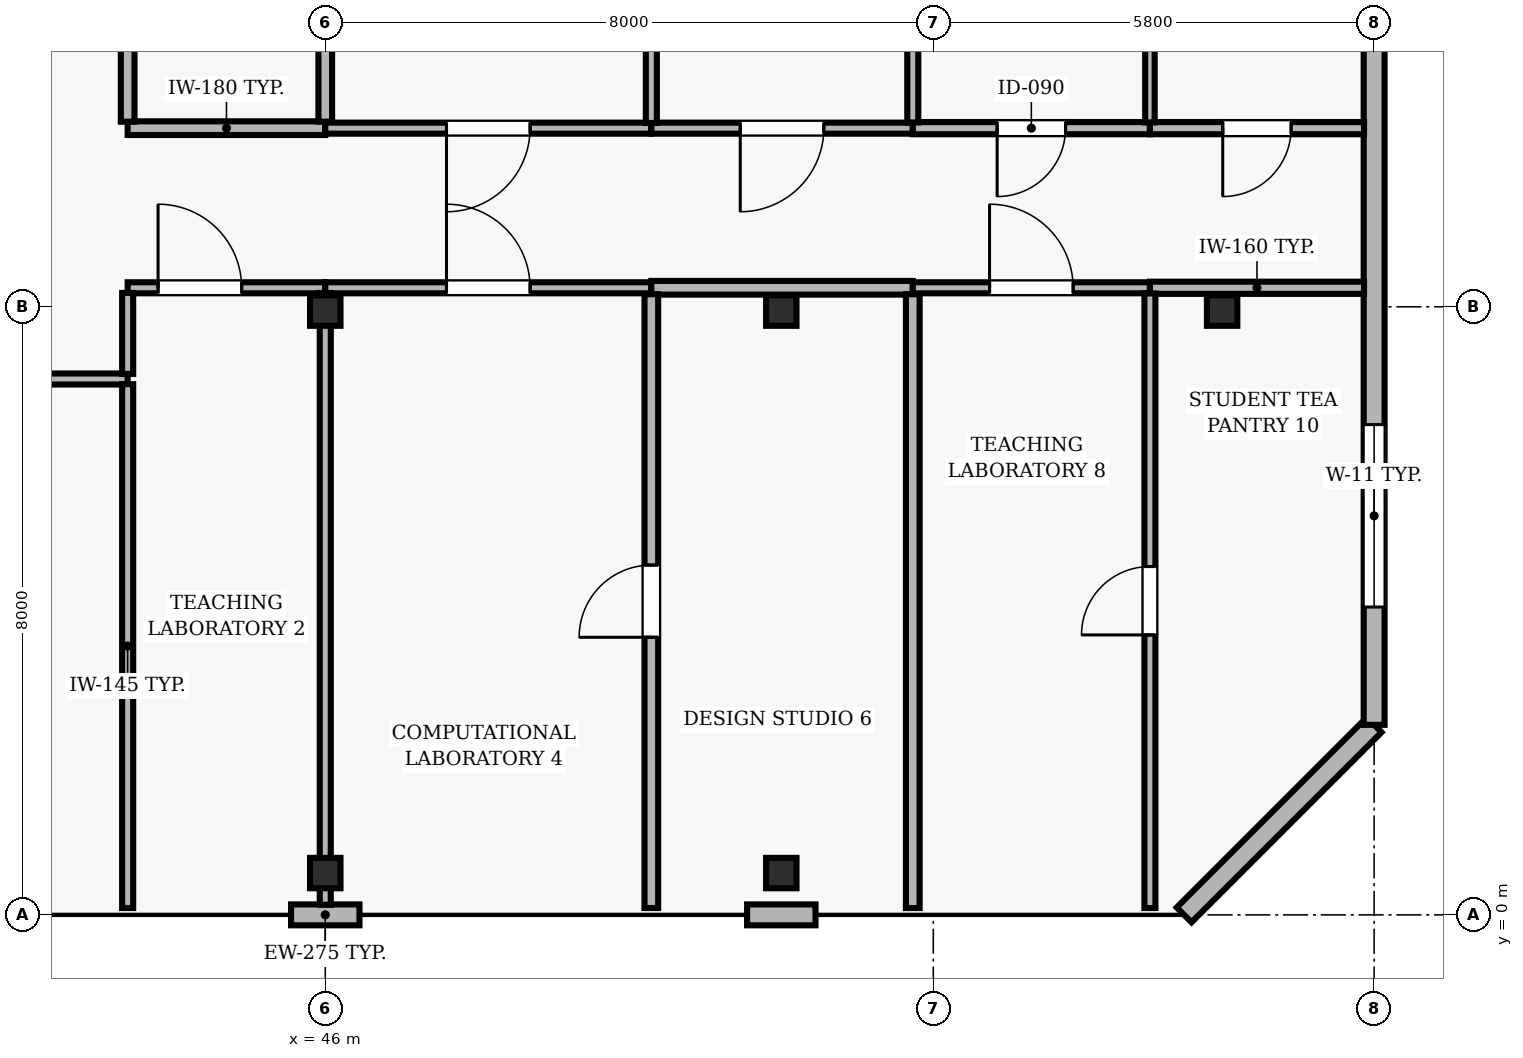
"""IFC4 building model, lengths in metres.
Left out: names, types, materials, properties, quantities, classifications, styles, units other than length and angle.
Written with IfcOpenShell. Run it as: python <this file> out.ifc"""

import sys

from ifc_helpers import new_model, si_unit, direction, frame, frame_2d, origin, origin_2d, place, context, subcontext, project, spatial, rectangle, hollow_rectangle, extrude, element, fill, save


model = new_model("IFC4")
c1 = context("Model", 3, precision=1e-05, world=origin(), true_north=direction((0.0, 1.0)))
c2 = subcontext(c1, "Body", "Model", "MODEL_VIEW")
j1 = project(units=[si_unit("LENGTHUNIT", "METRE"), si_unit("PLANEANGLEUNIT", "RADIAN")], contexts=[c1])
p1 = place(None, origin())
s1 = spatial("IfcSite", under=j1, at=p1, CompositionType="ELEMENT")
p2 = place(p1, origin())
s2 = spatial("IfcBuilding", under=s1, at=p2, CompositionType="ELEMENT")
p3 = place(p2, frame((0.0, 0.0, 279.4)))
s3 = spatial("IfcBuildingStorey", under=s2, at=p3, CompositionType="ELEMENT", Elevation=279.4)
for number, where, z_axis, x_axis in (
    (1, (46.0, 0.55, 0.0), (0.0, 0.0, 1.0), (1.0, 0.0, 0.0)),
    (2, (46.0, 7.95, 0.0), (0.0, 0.0, 1.0), (1.0, 0.0, 0.0)),
    (3, (52.0, 0.55, 0.0), (0.0, 0.0, 1.0), (1.0, 0.0, 0.0)),
    (4, (52.0, 7.95, 0.0), (0.0, 0.0, 1.0), (1.0, 0.0, 0.0)),
    (5, (57.8, 7.95, 0.0), (0.0, 0.0, 1.0), (1.0, 0.0, 0.0)),
):
    element("IfcColumn", number, at=place(p3, frame(where, z_axis=z_axis, x_axis=x_axis)), inside=s3, PredefinedType="COLUMN", context=c2, shape_type="SweptSolid", body=[
        extrude(hollow_rectangle(XDim=0.4, YDim=0.4, WallThickness=0.02, at=origin_2d()), origin(), (0.0, 0.0, 1.0), 3.9),
    ])
for number, where, z_axis, x_axis in (
    (6, (45.55, 0.0, 0.0), (0.0, 0.0, 1.0), (1.0, 0.0, 0.0)),
    (7, (51.55, 0.0, 0.0), (0.0, 0.0, 1.0), (1.0, 0.0, 0.0)),
):
    element("IfcWall", number, at=place(p3, frame(where, z_axis=z_axis, x_axis=x_axis)), inside=s3, PredefinedType="SOLIDWALL", context=c2, shape_type="SweptSolid", body=[
        extrude(rectangle(XDim=0.9, YDim=0.275, at=frame_2d((0.45, 0.0))), origin(), (0.0, 0.0, 1.0), 3.69),
    ])
p4 = place(p3, frame((57.3, 0.0, 0.0), z_axis=(0.0, 0.0, 1.0), x_axis=(0.707106781187, 0.707106781187, 0.0)))
e8 = element("IfcWall", 8, at=p4, inside=s3, PredefinedType="SOLIDWALL", context=c2, shape_type="SweptSolid", body=[
    extrude(rectangle(XDim=3.536, YDim=0.275, at=frame_2d((1.768, 0.0))), origin(), (0.0, 0.0, 1.0), 3.69),
])
p5 = place(p3, frame((59.8, 2.5, 0.0), z_axis=(0.0, 0.0, 1.0), x_axis=(0.0, 1.0, 0.0)))
e9 = element("IfcWall", 9, at=p5, inside=s3, PredefinedType="SOLIDWALL", context=c2, shape_type="SweptSolid", body=[
    extrude(rectangle(XDim=11.0, YDim=0.275, at=frame_2d((5.5, 0.0))), origin(), (0.0, 0.0, 1.0), 3.69),
])
p6 = place(p5, frame((1.55, 0.0, 0.9)))
e10 = element("IfcOpeningElement", 10, at=p6, cuts=e9, PredefinedType="OPENING", context=c2, shape_type="SweptSolid", body=[
    extrude(rectangle(XDim=2.4, YDim=2.2, at=frame_2d((1.2, 1.1))), frame((0.0, 0.147, 0.0), z_axis=(0.0, -1.0, 0.0), x_axis=(1.0, 0.0, 0.0)), (0.0, 0.0, 1.0), 0.295),
])
p7 = place(p3, frame((38.05, 7.05, 0.0), z_axis=(0.0, 0.0, 1.0), x_axis=(1.0, 0.0, 0.0)))
e11 = element("IfcWall", 11, at=p7, inside=s3, PredefinedType="PARTITIONING", context=c2, shape_type="SweptSolid", body=[
    extrude(rectangle(XDim=5.35, YDim=0.145, at=frame_2d((2.675, 0.0))), origin(), (0.0, 0.0, 1.0), 3.69),
])
p8 = place(p7, frame((2.125, 0.0, 0.0)))
e12 = element("IfcOpeningElement", 12, at=p8, cuts=e11, PredefinedType="OPENING", context=c2, shape_type="SweptSolid", body=[
    extrude(rectangle(XDim=1.1, YDim=2.15, at=frame_2d((0.55, 1.075))), frame((0.0, 0.083, 0.0), z_axis=(0.0, -1.0, 0.0), x_axis=(1.0, 0.0, 0.0)), (0.0, 0.0, 1.0), 0.165),
])
p9 = place(p3, frame((43.4, 8.25, 0.0), z_axis=(0.0, 0.0, 1.0), x_axis=(1.0, 0.0, 0.0)))
e13 = element("IfcWall", 13, at=p9, inside=s3, PredefinedType="PARTITIONING", context=c2, shape_type="SweptSolid", body=[
    extrude(rectangle(XDim=2.6, YDim=0.145, at=frame_2d((1.3, 0.0))), origin(), (0.0, 0.0, 1.0), 3.221),
])
p10 = place(p9, frame((0.4, 0.0, 0.0)))
e14 = element("IfcOpeningElement", 14, at=p10, cuts=e13, PredefinedType="OPENING", context=c2, shape_type="SweptSolid", body=[
    extrude(rectangle(XDim=1.1, YDim=2.15, at=frame_2d((0.55, 1.075))), frame((0.0, 0.083, 0.0), z_axis=(0.0, -1.0, 0.0), x_axis=(1.0, 0.0, 0.0)), (0.0, 0.0, 1.0), 0.165),
])
p11 = place(p3, frame((46.0, 8.25, 0.0), z_axis=(0.0, 0.0, 1.0), x_axis=(1.0, 0.0, 0.0)))
e15 = element("IfcWall", 15, at=p11, inside=s3, PredefinedType="PARTITIONING", context=c2, shape_type="SweptSolid", body=[
    extrude(rectangle(XDim=4.29, YDim=0.145, at=frame_2d((2.145, 0.0))), origin(), (0.0, 0.0, 1.0), 3.221),
])
p12 = place(p11, frame((1.595, 0.0, 0.0)))
e16 = element("IfcOpeningElement", 16, at=p12, cuts=e15, PredefinedType="OPENING", context=c2, shape_type="SweptSolid", body=[
    extrude(rectangle(XDim=1.1, YDim=2.15, at=frame_2d((0.55, 1.075))), frame((0.0, 0.083, 0.0), z_axis=(0.0, -1.0, 0.0), x_axis=(1.0, 0.0, 0.0)), (0.0, 0.0, 1.0), 0.165),
])
p13 = place(p3, frame((46.0, 10.35, 0.0), z_axis=(0.0, 0.0, 1.0), x_axis=(-1.0, 0.0, 0.0)))
e17 = element("IfcWall", 17, at=p13, inside=s3, PredefinedType="PARTITIONING", context=c2, shape_type="SweptSolid", body=[
    extrude(rectangle(XDim=2.6, YDim=0.18, at=frame_2d((1.3, 0.0))), origin(), (0.0, 0.0, 1.0), 3.372),
])
p14 = place(p3, frame((50.29, 8.25, 0.0), z_axis=(0.0, 0.0, 1.0), x_axis=(1.0, 0.0, 0.0)))
e18 = element("IfcWall", 18, at=p14, inside=s3, PredefinedType="PARTITIONING", context=c2, shape_type="SweptSolid", body=[
    extrude(rectangle(XDim=3.44, YDim=0.18, at=frame_2d((1.72, 0.0))), origin(), (0.0, 0.0, 1.0), 3.221),
])
p15 = place(p3, frame((50.29, 10.35, 0.0), z_axis=(0.0, 0.0, 1.0), x_axis=(-1.0, 0.0, 0.0)))
e19 = element("IfcWall", 19, at=p15, inside=s3, PredefinedType="PARTITIONING", context=c2, shape_type="SweptSolid", body=[
    extrude(rectangle(XDim=4.29, YDim=0.145, at=frame_2d((2.145, 0.0))), origin(), (0.0, 0.0, 1.0), 3.372),
])
p16 = place(p15, frame((1.595, 0.0, 0.0)))
e20 = element("IfcOpeningElement", 20, at=p16, cuts=e19, PredefinedType="OPENING", context=c2, shape_type="SweptSolid", body=[
    extrude(rectangle(XDim=1.1, YDim=2.15, at=frame_2d((0.55, 1.075))), frame((0.0, 0.083, 0.0), z_axis=(0.0, -1.0, 0.0), x_axis=(1.0, 0.0, 0.0)), (0.0, 0.0, 1.0), 0.165),
])
p17 = place(p3, frame((53.73, 8.25, 0.0), z_axis=(0.0, 0.0, 1.0), x_axis=(1.0, 0.0, 0.0)))
e21 = element("IfcWall", 21, at=p17, inside=s3, PredefinedType="PARTITIONING", context=c2, shape_type="SweptSolid", body=[
    extrude(rectangle(XDim=3.12, YDim=0.145, at=frame_2d((1.56, 0.0))), origin(), (0.0, 0.0, 1.0), 3.221),
])
p18 = place(p17, frame((1.01, 0.0, 0.0)))
e22 = element("IfcOpeningElement", 22, at=p18, cuts=e21, PredefinedType="OPENING", context=c2, shape_type="SweptSolid", body=[
    extrude(rectangle(XDim=1.1, YDim=2.15, at=frame_2d((0.55, 1.075))), frame((0.0, 0.083, 0.0), z_axis=(0.0, -1.0, 0.0), x_axis=(1.0, 0.0, 0.0)), (0.0, 0.0, 1.0), 0.165),
])
p19 = place(p3, frame((53.73, 10.35, 0.0), z_axis=(0.0, 0.0, 1.0), x_axis=(-1.0, 0.0, 0.0)))
e23 = element("IfcWall", 23, at=p19, inside=s3, PredefinedType="PARTITIONING", context=c2, shape_type="SweptSolid", body=[
    extrude(rectangle(XDim=3.44, YDim=0.145, at=frame_2d((1.72, 0.0))), origin(), (0.0, 0.0, 1.0), 3.372),
])
p20 = place(p19, frame((1.17, 0.0, 0.0)))
e24 = element("IfcOpeningElement", 24, at=p20, cuts=e23, PredefinedType="OPENING", context=c2, shape_type="SweptSolid", body=[
    extrude(rectangle(XDim=1.1, YDim=2.15, at=frame_2d((0.55, 1.075))), frame((0.0, 0.083, 0.0), z_axis=(0.0, -1.0, 0.0), x_axis=(1.0, 0.0, 0.0)), (0.0, 0.0, 1.0), 0.165),
])
p21 = place(p3, frame((56.85, 8.25, 0.0), z_axis=(0.0, 0.0, 1.0), x_axis=(1.0, 0.0, 0.0)))
e25 = element("IfcWall", 25, at=p21, inside=s3, PredefinedType="PARTITIONING", context=c2, shape_type="SweptSolid", body=[
    extrude(rectangle(XDim=2.817, YDim=0.16, at=frame_2d((1.408, 0.0))), origin(), (0.0, 0.0, 1.0), 3.221),
])
p22 = place(p3, frame((56.85, 10.35, 0.0), z_axis=(0.0, 0.0, 1.0), x_axis=(-1.0, 0.0, 0.0)))
e26 = element("IfcWall", 26, at=p22, inside=s3, PredefinedType="PARTITIONING", context=c2, shape_type="SweptSolid", body=[
    extrude(rectangle(XDim=3.12, YDim=0.16, at=frame_2d((1.56, 0.0))), origin(), (0.0, 0.0, 1.0), 3.372),
])
p23 = place(p22, frame((1.11, 0.0, 0.0)))
e27 = element("IfcOpeningElement", 27, at=p23, cuts=e26, PredefinedType="OPENING", context=c2, shape_type="SweptSolid", body=[
    extrude(rectangle(XDim=0.9, YDim=2.1, at=frame_2d((0.45, 1.05))), frame((0.0, 0.09, 0.0), z_axis=(0.0, -1.0, 0.0), x_axis=(1.0, 0.0, 0.0)), (0.0, 0.0, 1.0), 0.18),
])
p24 = place(p3, frame((59.667, 10.35, 0.0), z_axis=(0.0, 0.0, 1.0), x_axis=(-1.0, 0.0, 0.0)))
e28 = element("IfcWall", 28, at=p24, inside=s3, PredefinedType="PARTITIONING", context=c2, shape_type="SweptSolid", body=[
    extrude(rectangle(XDim=2.817, YDim=0.16, at=frame_2d((1.408, 0.0))), origin(), (0.0, 0.0, 1.0), 3.372),
])
p25 = place(p24, frame((0.959, 0.0, 0.0)))
e29 = element("IfcOpeningElement", 29, at=p25, cuts=e28, PredefinedType="OPENING", context=c2, shape_type="SweptSolid", body=[
    extrude(rectangle(XDim=0.9, YDim=2.1, at=frame_2d((0.45, 1.05))), frame((0.0, 0.09, 0.0), z_axis=(0.0, -1.0, 0.0), x_axis=(1.0, 0.0, 0.0)), (0.0, 0.0, 1.0), 0.18),
])
p26 = place(p3, frame((43.4, 0.09, 0.0), z_axis=(0.0, 0.0, 1.0), x_axis=(0.0, 1.0, 0.0)))
e30 = element("IfcWall", 30, at=p26, inside=s3, PredefinedType="PARTITIONING", context=c2, shape_type="SweptSolid", body=[
    extrude(rectangle(XDim=6.892, YDim=0.145, at=frame_2d((3.446, 0.0))), origin(), (0.0, 0.0, 1.0), 3.69),
])
p27 = place(p3, frame((43.4, 7.117, 0.0), z_axis=(0.0, 0.0, 1.0), x_axis=(0.0, 1.0, 0.0)))
e31 = element("IfcWall", 31, at=p27, inside=s3, PredefinedType="PARTITIONING", context=c2, shape_type="SweptSolid", body=[
    extrude(rectangle(XDim=1.065, YDim=0.145, at=frame_2d((0.532, 0.0))), origin(), (0.0, 0.0, 1.0), 3.69),
])
p28 = place(p3, frame((43.4, 10.435, 0.0), z_axis=(0.0, 0.0, 1.0), x_axis=(0.0, 1.0, 0.0)))
e32 = element("IfcWall", 32, at=p28, inside=s3, PredefinedType="PARTITIONING", context=c2, shape_type="SweptSolid", body=[
    extrude(rectangle(XDim=5.49, YDim=0.18, at=frame_2d((2.745, 0.0))), origin(), (0.0, 0.0, 1.0), 3.69),
])
p29 = place(p28, frame((2.27, 0.0, 0.0)))
e33 = element("IfcOpeningElement", 33, at=p29, cuts=e32, PredefinedType="OPENING", context=c2, shape_type="SweptSolid", body=[
    extrude(rectangle(XDim=0.95, YDim=2.1, at=frame_2d((0.475, 1.05))), frame((0.0, 0.1, 0.0), z_axis=(0.0, -1.0, 0.0), x_axis=(1.0, 0.0, 0.0)), (0.0, 0.0, 1.0), 0.2),
])
p30 = place(p3, frame((46.0, 0.133, 0.0), z_axis=(0.0, 0.0, 1.0), x_axis=(0.0, 1.0, 0.0)))
e34 = element("IfcWall", 34, at=p30, inside=s3, PredefinedType="PARTITIONING", context=c2, shape_type="SweptSolid", body=[
    extrude(rectangle(XDim=8.049, YDim=0.145, at=frame_2d((4.024, 0.0))), origin(), (0.0, 0.0, 1.0), 3.221),
])
p31 = place(p3, frame((46.0, 10.435, 0.0), z_axis=(0.0, 0.0, 1.0), x_axis=(0.0, 1.0, 0.0)))
e35 = element("IfcWall", 35, at=p31, inside=s3, PredefinedType="PARTITIONING", context=c2, shape_type="SweptSolid", body=[
    extrude(rectangle(XDim=5.432, YDim=0.18, at=frame_2d((2.716, 0.0))), origin(), (0.0, 0.0, 1.0), 3.221),
])
p32 = place(p3, frame((50.29, 0.09, 0.0), z_axis=(0.0, 0.0, 1.0), x_axis=(0.0, 1.0, 0.0)))
e36 = element("IfcWall", 36, at=p32, inside=s3, PredefinedType="PARTITIONING", context=c2, shape_type="SweptSolid", body=[
    extrude(rectangle(XDim=8.075, YDim=0.18, at=frame_2d((4.038, 0.0))), origin(), (0.0, 0.0, 1.0), 3.69),
])
p33 = place(p32, frame((3.562, 0.0, 0.0)))
e37 = element("IfcOpeningElement", 37, at=p33, cuts=e36, PredefinedType="OPENING", context=c2, shape_type="SweptSolid", body=[
    extrude(rectangle(XDim=0.95, YDim=2.1, at=frame_2d((0.475, 1.05))), frame((0.0, 0.1, 0.0), z_axis=(0.0, -1.0, 0.0), x_axis=(1.0, 0.0, 0.0)), (0.0, 0.0, 1.0), 0.2),
])
p34 = place(p3, frame((50.29, 10.418, 0.0), z_axis=(0.0, 0.0, 1.0), x_axis=(0.0, 1.0, 0.0)))
e38 = element("IfcWall", 38, at=p34, inside=s3, PredefinedType="PARTITIONING", context=c2, shape_type="SweptSolid", body=[
    extrude(rectangle(XDim=5.449, YDim=0.145, at=frame_2d((2.725, 0.0))), origin(), (0.0, 0.0, 1.0), 3.69),
])
p35 = place(p3, frame((53.73, 0.09, 0.0), z_axis=(0.0, 0.0, 1.0), x_axis=(0.0, 1.0, 0.0)))
e39 = element("IfcWall", 39, at=p35, inside=s3, PredefinedType="PARTITIONING", context=c2, shape_type="SweptSolid", body=[
    extrude(rectangle(XDim=8.075, YDim=0.18, at=frame_2d((4.038, 0.0))), origin(), (0.0, 0.0, 1.0), 3.69),
])
p36 = place(p3, frame((53.73, 10.425, 0.0), z_axis=(0.0, 0.0, 1.0), x_axis=(0.0, 1.0, 0.0)))
e40 = element("IfcWall", 40, at=p36, inside=s3, PredefinedType="PARTITIONING", context=c2, shape_type="SweptSolid", body=[
    extrude(rectangle(XDim=5.442, YDim=0.145, at=frame_2d((2.721, 0.0))), origin(), (0.0, 0.0, 1.0), 3.69),
])
p37 = place(p3, frame((56.85, 0.09, 0.0), z_axis=(0.0, 0.0, 1.0), x_axis=(0.0, 1.0, 0.0)))
e41 = element("IfcWall", 41, at=p37, inside=s3, PredefinedType="PARTITIONING", context=c2, shape_type="SweptSolid", body=[
    extrude(rectangle(XDim=8.085, YDim=0.145, at=frame_2d((4.042, 0.0))), origin(), (0.0, 0.0, 1.0), 3.69),
])
p38 = place(p37, frame((3.593, 0.0, 0.0)))
e42 = element("IfcOpeningElement", 42, at=p38, cuts=e41, PredefinedType="OPENING", context=c2, shape_type="SweptSolid", body=[
    extrude(rectangle(XDim=0.9, YDim=2.1, at=frame_2d((0.45, 1.05))), frame((0.0, 0.083, 0.0), z_axis=(0.0, -1.0, 0.0), x_axis=(1.0, 0.0, 0.0)), (0.0, 0.0, 1.0), 0.165),
])
p39 = place(p3, frame((56.85, 10.425, 0.0), z_axis=(0.0, 0.0, 1.0), x_axis=(0.0, 1.0, 0.0)))
e43 = element("IfcWall", 43, at=p39, inside=s3, PredefinedType="PARTITIONING", context=c2, shape_type="SweptSolid", body=[
    extrude(rectangle(XDim=5.442, YDim=0.125, at=frame_2d((2.721, 0.0))), origin(), (0.0, 0.0, 1.0), 3.69),
])
p40 = place(p6, origin())
e44 = element("IfcWindow", 44, at=p40, inside=s3, PartitioningType="SINGLE_PANEL", PredefinedType="WINDOW", context=c2, shape_type="SweptSolid", body=[
    extrude(rectangle(XDim=2.4, YDim=2.2, at=frame_2d((1.2, 1.1))), frame((0.0, 0.03, 0.0), z_axis=(0.0, -1.0, 0.0), x_axis=(1.0, 0.0, 0.0)), (0.0, 0.0, 1.0), 0.06),
])
fill(e10, e44)
p41 = place(p10, origin())
e45 = element("IfcDoor", 45, at=p41, inside=s3, OperationType="SINGLE_SWING_LEFT", PredefinedType="DOOR", context=c2, shape_type="SweptSolid", body=[
    extrude(rectangle(XDim=1.1, YDim=2.15, at=frame_2d((0.55, 1.075))), frame((0.0, 0.025, 0.0), z_axis=(0.0, -1.0, 0.0), x_axis=(1.0, 0.0, 0.0)), (0.0, 0.0, 1.0), 0.05),
])
fill(e14, e45)
p42 = place(p12, origin())
e46 = element("IfcDoor", 46, at=p42, inside=s3, OperationType="SINGLE_SWING_LEFT", PredefinedType="DOOR", context=c2, shape_type="SweptSolid", body=[
    extrude(rectangle(XDim=1.1, YDim=2.15, at=frame_2d((0.55, 1.075))), frame((0.0, 0.025, 0.0), z_axis=(0.0, -1.0, 0.0), x_axis=(1.0, 0.0, 0.0)), (0.0, 0.0, 1.0), 0.05),
])
fill(e16, e46)
p43 = place(p16, origin())
e47 = element("IfcDoor", 47, at=p43, inside=s3, OperationType="SINGLE_SWING_RIGHT", PredefinedType="DOOR", context=c2, shape_type="SweptSolid", body=[
    extrude(rectangle(XDim=1.1, YDim=2.15, at=frame_2d((0.55, 1.075))), frame((0.0, 0.025, 0.0), z_axis=(0.0, -1.0, 0.0), x_axis=(1.0, 0.0, 0.0)), (0.0, 0.0, 1.0), 0.05),
])
fill(e20, e47)
p44 = place(p33, origin())
e48 = element("IfcDoor", 48, at=p44, inside=s3, OperationType="SINGLE_SWING_LEFT", PredefinedType="DOOR", context=c2, shape_type="SweptSolid", body=[
    extrude(rectangle(XDim=0.95, YDim=2.1, at=frame_2d((0.475, 1.05))), frame((0.0, 0.025, 0.0), z_axis=(0.0, -1.0, 0.0), x_axis=(1.0, 0.0, 0.0)), (0.0, 0.0, 1.0), 0.05),
])
fill(e37, e48)
p45 = place(p20, origin())
e49 = element("IfcDoor", 49, at=p45, inside=s3, OperationType="SINGLE_SWING_RIGHT", PredefinedType="DOOR", context=c2, shape_type="SweptSolid", body=[
    extrude(rectangle(XDim=1.1, YDim=2.15, at=frame_2d((0.55, 1.075))), frame((0.0, 0.025, 0.0), z_axis=(0.0, -1.0, 0.0), x_axis=(1.0, 0.0, 0.0)), (0.0, 0.0, 1.0), 0.05),
])
fill(e24, e49)
p46 = place(p18, origin())
e50 = element("IfcDoor", 50, at=p46, inside=s3, OperationType="SINGLE_SWING_LEFT", PredefinedType="DOOR", context=c2, shape_type="SweptSolid", body=[
    extrude(rectangle(XDim=1.1, YDim=2.15, at=frame_2d((0.55, 1.075))), frame((0.0, 0.025, 0.0), z_axis=(0.0, -1.0, 0.0), x_axis=(1.0, 0.0, 0.0)), (0.0, 0.0, 1.0), 0.05),
])
fill(e22, e50)
p47 = place(p23, origin())
e51 = element("IfcDoor", 51, at=p47, inside=s3, OperationType="SINGLE_SWING_RIGHT", PredefinedType="DOOR", context=c2, shape_type="SweptSolid", body=[
    extrude(rectangle(XDim=0.9, YDim=2.1, at=frame_2d((0.45, 1.05))), frame((0.0, 0.025, 0.0), z_axis=(0.0, -1.0, 0.0), x_axis=(1.0, 0.0, 0.0)), (0.0, 0.0, 1.0), 0.05),
])
fill(e27, e51)
p48 = place(p38, origin())
e52 = element("IfcDoor", 52, at=p48, inside=s3, OperationType="SINGLE_SWING_LEFT", PredefinedType="DOOR", context=c2, shape_type="SweptSolid", body=[
    extrude(rectangle(XDim=0.9, YDim=2.1, at=frame_2d((0.45, 1.05))), frame((0.0, 0.025, 0.0), z_axis=(0.0, -1.0, 0.0), x_axis=(1.0, 0.0, 0.0)), (0.0, 0.0, 1.0), 0.05),
])
fill(e42, e52)
p49 = place(p25, origin())
e53 = element("IfcDoor", 53, at=p49, inside=s3, OperationType="SINGLE_SWING_RIGHT", PredefinedType="DOOR", context=c2, shape_type="SweptSolid", body=[
    extrude(rectangle(XDim=0.9, YDim=2.1, at=frame_2d((0.45, 1.05))), frame((0.0, 0.025, 0.0), z_axis=(0.0, -1.0, 0.0), x_axis=(1.0, 0.0, 0.0)), (0.0, 0.0, 1.0), 0.05),
])
fill(e29, e53)
save(model, sys.argv[1])
